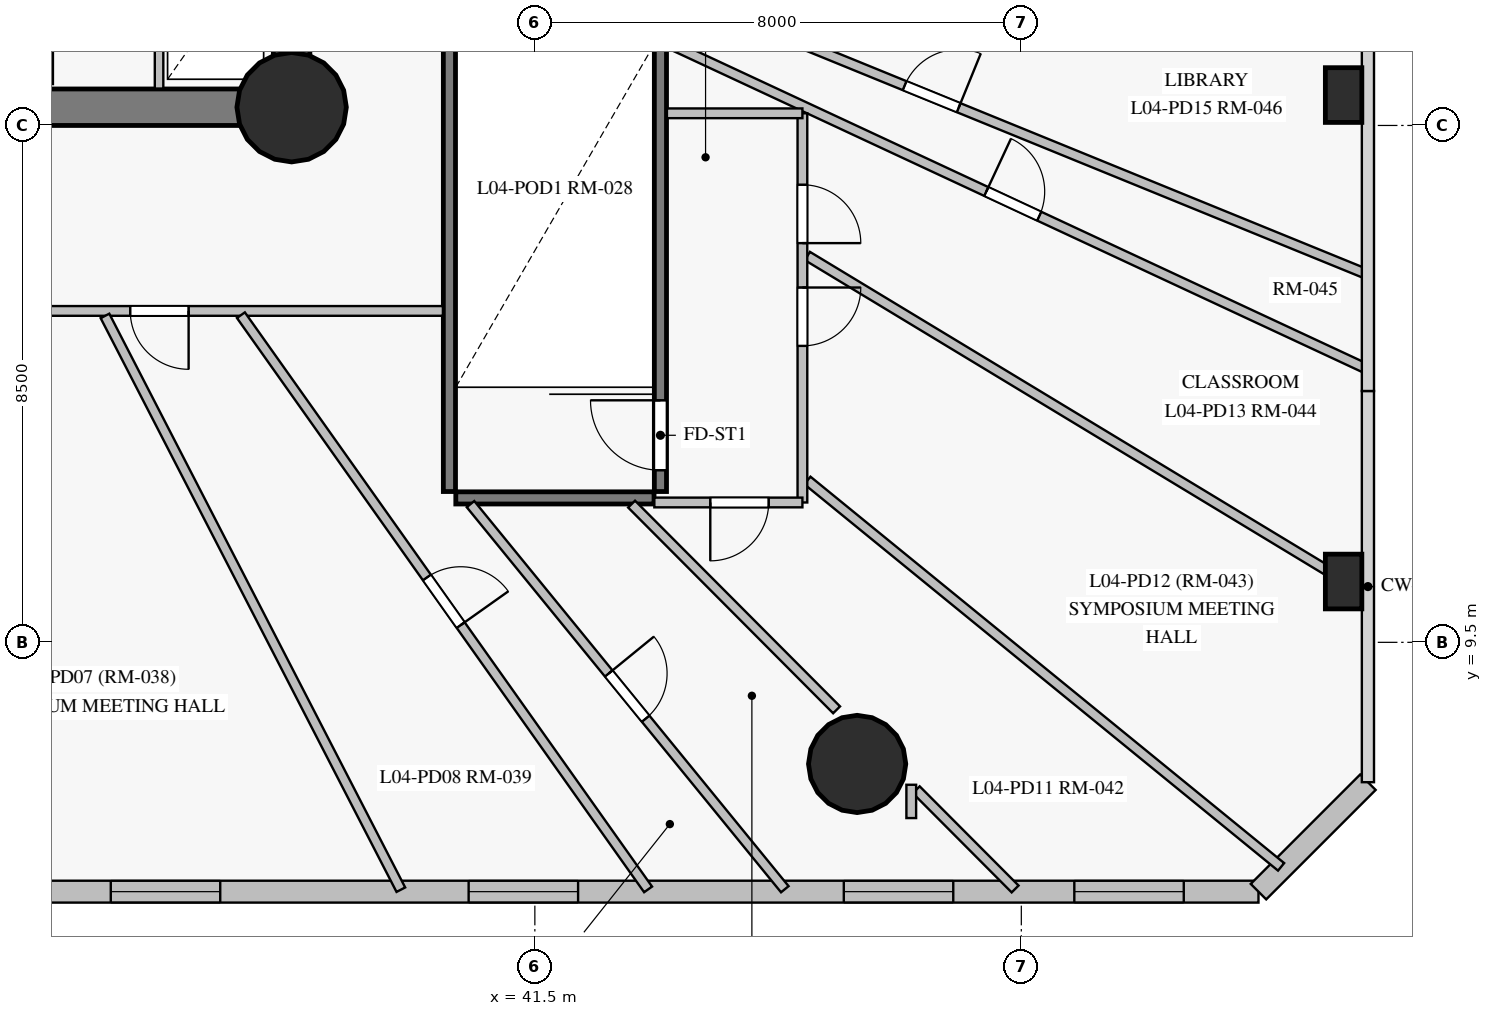
"""IFC4 building model, lengths in metres.
Left out: names, types, materials, properties, quantities, classifications, styles, units other than length and angle.
Written with IfcOpenShell. Run it as: python <this file> out.ifc"""

import sys

from ifc_helpers import new_model, si_unit, direction, frame, frame_2d, origin, origin_with_axes, origin_2d, place, context, subcontext, project, spatial, rectangle, circle, extrude, source, transform, mapped, element, fill, save


model = new_model("IFC4")
c1 = context("Model", 3, precision=1e-05, world=origin(), true_north=direction((0.0, 1.0)))
c2 = subcontext(c1, "Body", "Model", "MODEL_VIEW")
j1 = project(units=[si_unit("LENGTHUNIT", "METRE"), si_unit("PLANEANGLEUNIT", "RADIAN")], contexts=[c1])
p1 = place(None, origin())
s1 = spatial("IfcSite", under=j1, at=p1, CompositionType="ELEMENT")
p2 = place(p1, origin())
s2 = spatial("IfcBuilding", under=s1, at=p2, CompositionType="ELEMENT")
p3 = place(p2, frame((0.0, 0.0, 18.0)))
s3 = spatial("IfcBuildingStorey", under=s2, at=p3, CompositionType="ELEMENT", Elevation=18.0)
p4 = place(p3, frame((26.55, 18.3, 0.0), z_axis=(0.0, 0.0, 1.0), x_axis=(1.0, 0.0, 0.0)))
e1 = element("IfcWall", 1, at=p4, inside=s3, PredefinedType="SHEAR", context=c2, shape_type="SweptSolid", body=[
    extrude(rectangle(XDim=10.95, YDim=0.6, at=frame_2d((5.475, 0.0))), origin(), (0.0, 0.0, 1.0), 4.225),
])
p5 = place(p4, frame((4.55, 0.0, 0.0)))
e2 = element("IfcOpeningElement", 2, at=p5, cuts=e1, PredefinedType="OPENING", context=c2, shape_type="SweptSolid", body=[
    extrude(rectangle(XDim=1.4, YDim=2.2, at=frame_2d((0.7, 1.1))), frame((0.0, 0.31, 0.0), z_axis=(0.0, -1.0, 0.0), x_axis=(1.0, 0.0, 0.0)), (0.0, 0.0, 1.0), 0.62),
])
p6 = place(p3, frame((37.5, 18.3, 0.0), z_axis=(0.0, 0.0, 1.0), x_axis=(0.0, 1.0, 0.0)))
e3 = element("IfcWall", 3, at=p6, inside=s3, PredefinedType="SHEAR", context=c2, shape_type="SweptSolid", body=[
    extrude(rectangle(XDim=16.4, YDim=0.6, at=frame_2d((8.2, 0.0))), origin(), (0.0, 0.0, 1.0), 4.225),
])
p7 = place(p6, frame((13.96, 0.0, 0.0)))
e4 = element("IfcOpeningElement", 4, at=p7, cuts=e3, PredefinedType="OPENING", context=c2, shape_type="SweptSolid", body=[
    extrude(rectangle(XDim=1.2, YDim=2.15, at=frame_2d((0.6, 1.075))), frame((0.0, 0.31, 0.0), z_axis=(0.0, -1.0, 0.0), x_axis=(1.0, 0.0, 0.0)), (0.0, 0.0, 1.0), 0.62),
])
m1 = source(origin_with_axes(), c2, "Body", "SweptSolid", [
    extrude(circle(Radius=0.9, at=origin_2d()), origin(), (0.0, 0.0, 1.0), 4.5),
])
p8 = place(p3, frame((37.5, 18.3, 0.0), z_axis=(0.0, 0.0, 1.0), x_axis=(1.0, 0.0, 0.0)))
e5 = element("IfcColumn", 5, at=p8, inside=s3, PredefinedType="COLUMN", context=c2, shape_type="MappedRepresentation", body=[
    mapped(m1, transform((0.0, 0.0, 0.0), scale=1.0)),
])
m2 = source(origin_with_axes(), c2, "Body", "SweptSolid", [
    extrude(circle(Radius=0.8, at=origin_2d()), origin(), (0.0, 0.0, 1.0), 4.5),
])
p9 = place(p3, frame((46.8, 7.5, 0.0), z_axis=(0.0, 0.0, 1.0), x_axis=(1.0, 0.0, 0.0)))
e6 = element("IfcColumn", 6, at=p9, inside=s3, PredefinedType="COLUMN", context=c2, shape_type="MappedRepresentation", body=[
    mapped(m2, transform((0.0, 0.0, 0.0), scale=1.0)),
])
m3 = source(origin_with_axes(), c2, "Body", "SweptSolid", [
    extrude(rectangle(XDim=0.6, YDim=0.9, at=origin_2d()), origin(), (0.0, 0.0, 1.0), 4.5),
])
for number, where, z_axis, x_axis in (
    (7, (54.8, 10.5, 0.0), (0.0, 0.0, 1.0), (1.0, 0.0, 0.0)),
    (8, (54.8, 18.5, 0.0), (0.0, 0.0, 1.0), (1.0, 0.0, 0.0)),
):
    element("IfcColumn", number, at=place(p3, frame(where, z_axis=z_axis, x_axis=x_axis)), inside=s3, PredefinedType="PILASTER", context=c2, shape_type="MappedRepresentation", body=[
        mapped(m3, transform((0.0, 0.0, 0.0), scale=1.0)),
    ])
p10 = place(p3, frame((9.1, 5.4, 0.0), z_axis=(0.0, 0.0, 1.0), x_axis=(1.0, 0.0, 0.0)))
e9 = element("IfcWall", 9, at=p10, inside=s3, PredefinedType="SOLIDWALL", context=c2, shape_type="SweptSolid", body=[
    extrude(rectangle(XDim=44.3, YDim=0.36, at=frame_2d((22.15, 0.0))), origin(), (0.0, 0.0, 1.0), 4.225),
])
p11 = place(p10, frame((0.934, 0.0, 0.85)))
e10 = element("IfcOpeningElement", 10, at=p11, cuts=e9, PredefinedType="OPENING", context=c2, shape_type="SweptSolid", body=[
    extrude(rectangle(XDim=1.8, YDim=2.2, at=frame_2d((0.9, 1.1))), frame((0.0, 0.19, 0.0), z_axis=(0.0, -1.0, 0.0), x_axis=(1.0, 0.0, 0.0)), (0.0, 0.0, 1.0), 0.38),
])
p12 = place(p10, frame((8.148, 0.0, 0.85)))
e11 = element("IfcOpeningElement", 11, at=p12, cuts=e9, PredefinedType="OPENING", context=c2, shape_type="SweptSolid", body=[
    extrude(rectangle(XDim=1.8, YDim=2.2, at=frame_2d((0.9, 1.1))), frame((0.0, 0.19, 0.0), z_axis=(0.0, -1.0, 0.0), x_axis=(1.0, 0.0, 0.0)), (0.0, 0.0, 1.0), 0.38),
])
p13 = place(p10, frame((13.3, 0.0, 0.85)))
e12 = element("IfcOpeningElement", 12, at=p13, cuts=e9, PredefinedType="OPENING", context=c2, shape_type="SweptSolid", body=[
    extrude(rectangle(XDim=1.8, YDim=2.2, at=frame_2d((0.9, 1.1))), frame((0.0, 0.19, 0.0), z_axis=(0.0, -1.0, 0.0), x_axis=(1.0, 0.0, 0.0)), (0.0, 0.0, 1.0), 0.38),
])
p14 = place(p10, frame((18.486, 0.0, 0.85)))
e13 = element("IfcOpeningElement", 13, at=p14, cuts=e9, PredefinedType="OPENING", context=c2, shape_type="SweptSolid", body=[
    extrude(rectangle(XDim=1.8, YDim=2.2, at=frame_2d((0.9, 1.1))), frame((0.0, 0.19, 0.0), z_axis=(0.0, -1.0, 0.0), x_axis=(1.0, 0.0, 0.0)), (0.0, 0.0, 1.0), 0.38),
])
p15 = place(p10, frame((25.426, 0.0, 0.85)))
e14 = element("IfcOpeningElement", 14, at=p15, cuts=e9, PredefinedType="OPENING", context=c2, shape_type="SweptSolid", body=[
    extrude(rectangle(XDim=1.8, YDim=2.2, at=frame_2d((0.9, 1.1))), frame((0.0, 0.19, 0.0), z_axis=(0.0, -1.0, 0.0), x_axis=(1.0, 0.0, 0.0)), (0.0, 0.0, 1.0), 0.38),
])
p16 = place(p10, frame((31.311, 0.0, 0.85)))
e15 = element("IfcOpeningElement", 15, at=p16, cuts=e9, PredefinedType="OPENING", context=c2, shape_type="SweptSolid", body=[
    extrude(rectangle(XDim=1.8, YDim=2.2, at=frame_2d((0.9, 1.1))), frame((0.0, 0.19, 0.0), z_axis=(0.0, -1.0, 0.0), x_axis=(1.0, 0.0, 0.0)), (0.0, 0.0, 1.0), 0.38),
])
p17 = place(p10, frame((37.481, 0.0, 0.85)))
e16 = element("IfcOpeningElement", 16, at=p17, cuts=e9, PredefinedType="OPENING", context=c2, shape_type="SweptSolid", body=[
    extrude(rectangle(XDim=1.8, YDim=2.2, at=frame_2d((0.9, 1.1))), frame((0.0, 0.19, 0.0), z_axis=(0.0, -1.0, 0.0), x_axis=(1.0, 0.0, 0.0)), (0.0, 0.0, 1.0), 0.38),
])
p18 = place(p10, frame((41.271, 0.0, 0.85)))
e17 = element("IfcOpeningElement", 17, at=p18, cuts=e9, PredefinedType="OPENING", context=c2, shape_type="SweptSolid", body=[
    extrude(rectangle(XDim=1.8, YDim=2.2, at=frame_2d((0.9, 1.1))), frame((0.0, 0.19, 0.0), z_axis=(0.0, -1.0, 0.0), x_axis=(1.0, 0.0, 0.0)), (0.0, 0.0, 1.0), 0.38),
])
p19 = place(p3, frame((53.4, 5.4, 0.0), z_axis=(0.0, 0.0, 1.0), x_axis=(0.707106781187, 0.707106781187, 0.0)))
e18 = element("IfcWall", 18, at=p19, inside=s3, PredefinedType="SOLIDWALL", context=c2, shape_type="SweptSolid", body=[
    extrude(rectangle(XDim=2.546, YDim=0.36, at=frame_2d((1.273, 0.0))), origin(), (0.0, 0.0, 1.0), 4.225),
])
p20 = place(p3, frame((40.095, 11.98, 0.0), z_axis=(0.0, 0.0, 1.0), x_axis=(0.0, 1.0, 0.0)))
e19 = element("IfcWall", 19, at=p20, inside=s3, PredefinedType="SHEAR", context=c2, shape_type="SweptSolid", body=[
    extrude(rectangle(XDim=7.35, YDim=0.2, at=frame_2d((3.675, 0.0))), origin(), (0.0, 0.0, 1.0), 4.225),
])
p21 = place(p3, frame((43.565, 11.98, 0.0), z_axis=(0.0, 0.0, 1.0), x_axis=(0.0, 1.0, 0.0)))
e20 = element("IfcWall", 20, at=p21, inside=s3, PredefinedType="SHEAR", context=c2, shape_type="SweptSolid", body=[
    extrude(rectangle(XDim=7.35, YDim=0.2, at=frame_2d((3.675, 0.0))), origin(), (0.0, 0.0, 1.0), 4.225),
])
p22 = place(p21, frame((0.35, 0.0, 0.0)))
e21 = element("IfcOpeningElement", 21, at=p22, cuts=e20, PredefinedType="OPENING", context=c2, shape_type="SweptSolid", body=[
    extrude(rectangle(XDim=1.15, YDim=2.15, at=frame_2d((0.575, 1.075))), frame((0.0, 0.11, 0.0), z_axis=(0.0, -1.0, 0.0), x_axis=(1.0, 0.0, 0.0)), (0.0, 0.0, 1.0), 0.22),
])
p23 = place(p3, frame((40.2, 11.875, 0.0), z_axis=(0.0, 0.0, 1.0), x_axis=(1.0, 0.0, 0.0)))
e22 = element("IfcWall", 22, at=p23, inside=s3, PredefinedType="SHEAR", context=c2, shape_type="SweptSolid", body=[
    extrude(rectangle(XDim=3.26, YDim=0.2, at=frame_2d((1.63, 0.0))), origin(), (0.0, 0.0, 1.0), 4.225),
])
p24 = place(p3, frame((40.918, 21.372, 0.0), z_axis=(0.0, 0.0, 1.0), x_axis=(0.92597161246, -0.377593131449, 0.0)))
e23 = element("IfcWall", 23, at=p24, inside=s3, PredefinedType="PARTITIONING", context=c2, shape_type="SweptSolid", body=[
    extrude(rectangle(XDim=15.392, YDim=0.16, at=frame_2d((7.696, 0.0))), origin(), (0.0, 0.0, 1.0), 2.725),
])
p25 = place(p24, frame((7.196, 0.0, 0.0)))
e24 = element("IfcOpeningElement", 24, at=p25, cuts=e23, PredefinedType="OPENING", context=c2, shape_type="SweptSolid", body=[
    extrude(rectangle(XDim=0.96, YDim=2.15, at=frame_2d((0.48, 1.075))), frame((0.0, 0.09, 0.0), z_axis=(0.0, -1.0, 0.0), x_axis=(1.0, 0.0, 0.0)), (0.0, 0.0, 1.0), 0.18),
])
p26 = place(p3, frame((39.988, 14.95, 0.0), z_axis=(0.0, 0.0, 1.0), x_axis=(-1.0, 0.0, 0.0)))
e25 = element("IfcWall", 25, at=p26, inside=s3, PredefinedType="PARTITIONING", context=c2, shape_type="SweptSolid", body=[
    extrude(rectangle(XDim=14.588, YDim=0.16, at=frame_2d((7.294, 0.0))), origin(), (0.0, 0.0, 1.0), 2.825),
])
p27 = place(p26, frame((10.34, 0.0, 0.0)))
e26 = element("IfcOpeningElement", 26, at=p27, cuts=e25, PredefinedType="OPENING", context=c2, shape_type="SweptSolid", body=[
    extrude(rectangle(XDim=0.96, YDim=2.15, at=frame_2d((0.48, 1.075))), frame((0.0, 0.09, 0.0), z_axis=(0.0, -1.0, 0.0), x_axis=(1.0, 0.0, 0.0)), (0.0, 0.0, 1.0), 0.18),
])
p28 = place(p26, frame((6.735, 0.0, 0.0)))
e27 = element("IfcOpeningElement", 27, at=p28, cuts=e25, PredefinedType="OPENING", context=c2, shape_type="SweptSolid", body=[
    extrude(rectangle(XDim=0.96, YDim=2.15, at=frame_2d((0.48, 1.075))), frame((0.0, 0.09, 0.0), z_axis=(0.0, -1.0, 0.0), x_axis=(1.0, 0.0, 0.0)), (0.0, 0.0, 1.0), 0.18),
])
p29 = place(p26, frame((4.182, 0.0, 0.0)))
e28 = element("IfcOpeningElement", 28, at=p29, cuts=e25, PredefinedType="OPENING", context=c2, shape_type="SweptSolid", body=[
    extrude(rectangle(XDim=0.96, YDim=2.15, at=frame_2d((0.48, 1.075))), frame((0.0, 0.09, 0.0), z_axis=(0.0, -1.0, 0.0), x_axis=(1.0, 0.0, 0.0)), (0.0, 0.0, 1.0), 0.18),
])
p30 = place(p3, frame((43.573, 19.408, 0.0), z_axis=(0.0, 0.0, 1.0), x_axis=(0.906378533885, -0.422466511468, 0.0)))
e29 = element("IfcWall", 29, at=p30, inside=s3, PredefinedType="PARTITIONING", context=c2, shape_type="SweptSolid", body=[
    extrude(rectangle(XDim=12.794, YDim=0.16, at=frame_2d((6.397, 0.0))), origin(), (0.0, 0.0, 1.0), 2.725),
])
p31 = place(p30, frame((5.905, 0.0, 0.0)))
e30 = element("IfcOpeningElement", 30, at=p31, cuts=e29, PredefinedType="OPENING", context=c2, shape_type="SweptSolid", body=[
    extrude(rectangle(XDim=0.96, YDim=2.15, at=frame_2d((0.48, 1.075))), frame((0.0, 0.09, 0.0), z_axis=(0.0, -1.0, 0.0), x_axis=(1.0, 0.0, 0.0)), (0.0, 0.0, 1.0), 0.18),
])
p32 = place(p3, frame((36.666, 14.88, 0.0), z_axis=(0.0, 0.0, 1.0), x_axis=(0.578443831224, -0.815722216272, 0.0)))
e31 = element("IfcWall", 31, at=p32, inside=s3, PredefinedType="PARTITIONING", context=c2, shape_type="SweptSolid", body=[
    extrude(rectangle(XDim=11.576, YDim=0.16, at=frame_2d((5.788, 0.0))), origin(), (0.0, 0.0, 1.0), 4.225),
])
p33 = place(p32, frame((5.288, 0.0, 0.0)))
e32 = element("IfcOpeningElement", 32, at=p33, cuts=e31, PredefinedType="OPENING", context=c2, shape_type="SweptSolid", body=[
    extrude(rectangle(XDim=0.96, YDim=2.15, at=frame_2d((0.48, 1.075))), frame((0.0, 0.09, 0.0), z_axis=(0.0, -1.0, 0.0), x_axis=(1.0, 0.0, 0.0)), (0.0, 0.0, 1.0), 0.18),
])
p34 = place(p3, frame((45.982, 15.853, 0.0), z_axis=(0.0, 0.0, 1.0), x_axis=(0.855606653808, -0.517626558398, 0.0)))
e33 = element("IfcWall", 33, at=p34, inside=s3, PredefinedType="PARTITIONING", context=c2, shape_type="SweptSolid", body=[
    extrude(rectangle(XDim=10.733, YDim=0.16, at=frame_2d((5.367, 0.0))), origin(), (0.0, 0.0, 1.0), 4.225),
])
p35 = place(p3, frame((34.431, 14.868, 0.0), z_axis=(0.0, 0.0, 1.0), x_axis=(0.458318369651, -0.888788091752, 0.0)))
e34 = element("IfcWall", 34, at=p35, inside=s3, PredefinedType="PARTITIONING", context=c2, shape_type="SweptSolid", body=[
    extrude(rectangle(XDim=10.616, YDim=0.16, at=frame_2d((5.308, 0.0))), origin(), (0.0, 0.0, 1.0), 4.225),
])
p36 = place(p3, frame((45.982, 12.162, 0.0), z_axis=(0.0, 0.0, 1.0), x_axis=(0.774901017442, -0.632082599956, 0.0)))
e35 = element("IfcWall", 35, at=p36, inside=s3, PredefinedType="PARTITIONING", context=c2, shape_type="SweptSolid", body=[
    extrude(rectangle(XDim=10.053, YDim=0.16, at=frame_2d((5.027, 0.0))), origin(), (0.0, 0.0, 1.0), 4.225),
])
p37 = place(p3, frame((40.442, 11.773, 0.0), z_axis=(0.0, 0.0, 1.0), x_axis=(0.632298947072, -0.774724493954, 0.0)))
e36 = element("IfcWall", 36, at=p37, inside=s3, PredefinedType="PARTITIONING", context=c2, shape_type="SweptSolid", body=[
    extrude(rectangle(XDim=8.175, YDim=0.16, at=frame_2d((4.087, 0.0))), origin(), (0.0, 0.0, 1.0), 4.225),
])
p38 = place(p37, frame((3.595, 0.0, 0.0)))
e37 = element("IfcOpeningElement", 37, at=p38, cuts=e36, PredefinedType="OPENING", context=c2, shape_type="SweptSolid", body=[
    extrude(rectangle(XDim=0.96, YDim=2.15, at=frame_2d((0.48, 1.075))), frame((0.0, 0.09, 0.0), z_axis=(0.0, -1.0, 0.0), x_axis=(1.0, 0.0, 0.0)), (0.0, 0.0, 1.0), 0.18),
])
p39 = place(p3, frame((45.9, 18.2, 0.0), z_axis=(0.0, 0.0, 1.0), x_axis=(0.0, -1.0, 0.0)))
e38 = element("IfcWall", 38, at=p39, inside=s3, PredefinedType="PARTITIONING", context=c2, shape_type="SweptSolid", body=[
    extrude(rectangle(XDim=6.4, YDim=0.16, at=frame_2d((3.2, 0.0))), origin(), (0.0, 0.0, 1.0), 4.225),
])
p40 = place(p39, frame((2.865, 0.0, 0.0)))
e39 = element("IfcOpeningElement", 39, at=p40, cuts=e38, PredefinedType="OPENING", context=c2, shape_type="SweptSolid", body=[
    extrude(rectangle(XDim=0.96, YDim=2.15, at=frame_2d((0.48, 1.075))), frame((0.0, 0.09, 0.0), z_axis=(0.0, -1.0, 0.0), x_axis=(1.0, 0.0, 0.0)), (0.0, 0.0, 1.0), 0.18),
])
p41 = place(p39, frame((1.175, 0.0, 0.0)))
e40 = element("IfcOpeningElement", 40, at=p41, cuts=e38, PredefinedType="OPENING", context=c2, shape_type="SweptSolid", body=[
    extrude(rectangle(XDim=0.96, YDim=2.15, at=frame_2d((0.48, 1.075))), frame((0.0, 0.09, 0.0), z_axis=(0.0, -1.0, 0.0), x_axis=(1.0, 0.0, 0.0)), (0.0, 0.0, 1.0), 0.18),
])
p42 = place(p3, frame((43.091, 11.773, 0.0), z_axis=(0.0, 0.0, 1.0), x_axis=(0.705853252823, -0.708358091278, 0.0)))
e41 = element("IfcWall", 41, at=p42, inside=s3, PredefinedType="PARTITIONING", context=c2, shape_type="SweptSolid", body=[
    extrude(rectangle(XDim=4.776, YDim=0.16, at=frame_2d((2.388, 0.0))), origin(), (0.0, 0.0, 1.0), 2.725),
])
p43 = place(p3, frame((35.32, 18.607, 0.0), z_axis=(0.0, 0.0, 1.0), x_axis=(0.0, 1.0, 0.0)))
e42 = element("IfcWall", 42, at=p43, inside=s3, PredefinedType="PARTITIONING", context=c2, shape_type="SweptSolid", body=[
    extrude(rectangle(XDim=2.503, YDim=0.14, at=frame_2d((1.251, 0.0))), origin(), (0.0, 0.0, 1.0), 4.225),
])
p44 = place(p3, frame((47.772, 7.075, 0.0), z_axis=(0.0, 0.0, 1.0), x_axis=(0.705886856968, -0.708324604372, 0.0)))
e43 = element("IfcWall", 43, at=p44, inside=s3, PredefinedType="PARTITIONING", context=c2, shape_type="SweptSolid", body=[
    extrude(rectangle(XDim=2.303, YDim=0.16, at=frame_2d((1.152, 0.0))), origin(), (0.0, 0.0, 1.0), 4.225),
])
p45 = place(p3, frame((45.9, 11.8, 0.0), z_axis=(0.0, 0.0, 1.0), x_axis=(-1.0, 0.0, 0.0)))
e44 = element("IfcWall", 44, at=p45, inside=s3, PredefinedType="PARTITIONING", context=c2, shape_type="SweptSolid", body=[
    extrude(rectangle(XDim=2.435, YDim=0.16, at=frame_2d((1.217, 0.0))), origin(), (0.0, 0.0, 1.0), 4.225),
])
p46 = place(p45, frame((0.555, 0.0, 0.0)))
e45 = element("IfcOpeningElement", 45, at=p46, cuts=e44, PredefinedType="OPENING", context=c2, shape_type="SweptSolid", body=[
    extrude(rectangle(XDim=0.96, YDim=2.15, at=frame_2d((0.48, 1.075))), frame((0.0, 0.09, 0.0), z_axis=(0.0, -1.0, 0.0), x_axis=(1.0, 0.0, 0.0)), (0.0, 0.0, 1.0), 0.18),
])
p47 = place(p3, frame((43.672, 18.2, 0.0), z_axis=(0.0, 0.0, 1.0), x_axis=(1.0, 0.0, 0.0)))
e46 = element("IfcWall", 46, at=p47, inside=s3, PredefinedType="PARTITIONING", context=c2, shape_type="SweptSolid", body=[
    extrude(rectangle(XDim=2.228, YDim=0.16, at=frame_2d((1.114, 0.0))), origin(), (0.0, 0.0, 1.0), 4.225),
])
p48 = place(p3, frame((47.69, 6.61, 0.0), z_axis=(0.0, 0.0, 1.0), x_axis=(0.0, 1.0, 0.0)))
e47 = element("IfcWall", 47, at=p48, inside=s3, PredefinedType="PARTITIONING", context=c2, shape_type="SweptSolid", body=[
    extrude(rectangle(XDim=0.548, YDim=0.16, at=frame_2d((0.274, 0.0))), origin(), (0.0, 0.0, 1.0), 4.225),
])
m4 = source(origin_with_axes(), c2, "Body", "SweptSolid", [
    extrude(rectangle(XDim=1.8, YDim=2.2, at=frame_2d((0.9, 1.1))), frame((0.0, 0.03, 0.0), z_axis=(0.0, -1.0, 0.0), x_axis=(1.0, 0.0, 0.0)), (0.0, 0.0, 1.0), 0.06),
])
p49 = place(p15, origin())
e48 = element("IfcWindow", 48, at=p49, inside=s3, PartitioningType="SINGLE_PANEL", PredefinedType="WINDOW", context=c2, shape_type="MappedRepresentation", body=[
    mapped(m4, transform((0.0, 0.0, 0.0), scale=1.0)),
])
fill(e14, e48)
p50 = place(p16, origin())
e49 = element("IfcWindow", 49, at=p50, inside=s3, PartitioningType="SINGLE_PANEL", PredefinedType="WINDOW", context=c2, shape_type="MappedRepresentation", body=[
    mapped(m4, transform((0.0, 0.0, 0.0), scale=1.0)),
])
fill(e15, e49)
p51 = place(p17, origin())
e50 = element("IfcWindow", 50, at=p51, inside=s3, PartitioningType="SINGLE_PANEL", PredefinedType="WINDOW", context=c2, shape_type="MappedRepresentation", body=[
    mapped(m4, transform((0.0, 0.0, 0.0), scale=1.0)),
])
fill(e16, e50)
p52 = place(p18, origin())
e51 = element("IfcWindow", 51, at=p52, inside=s3, PartitioningType="SINGLE_PANEL", PredefinedType="WINDOW", context=c2, shape_type="MappedRepresentation", body=[
    mapped(m4, transform((0.0, 0.0, 0.0), scale=1.0)),
])
fill(e17, e51)
m5 = source(origin_with_axes(), c2, "Body", "SweptSolid", [
    extrude(rectangle(XDim=1.15, YDim=2.15, at=frame_2d((0.575, 1.075))), frame((0.0, 0.025, 0.0), z_axis=(0.0, -1.0, 0.0), x_axis=(1.0, 0.0, 0.0)), (0.0, 0.0, 1.0), 0.05),
])
p53 = place(p22, origin())
e52 = element("IfcDoor", 52, at=p53, inside=s3, OperationType="SINGLE_SWING_RIGHT", PredefinedType="DOOR", context=c2, shape_type="MappedRepresentation", body=[
    mapped(m5, transform((0.0, 0.0, 0.0), scale=1.0)),
])
fill(e21, e52)
m6 = source(origin_with_axes(), c2, "Body", "SweptSolid", [
    extrude(rectangle(XDim=0.96, YDim=2.15, at=frame_2d((0.48, 1.075))), frame((0.0, 0.025, 0.0), z_axis=(0.0, -1.0, 0.0), x_axis=(1.0, 0.0, 0.0)), (0.0, 0.0, 1.0), 0.05),
])
p54 = place(p29, origin())
e53 = element("IfcDoor", 53, at=p54, inside=s3, OperationType="SINGLE_SWING_LEFT", PredefinedType="DOOR", context=c2, shape_type="MappedRepresentation", body=[
    mapped(m6, transform((0.0, 0.0, 0.0), scale=1.0)),
])
fill(e28, e53)
p55 = place(p33, origin())
e54 = element("IfcDoor", 54, at=p55, inside=s3, OperationType="SINGLE_SWING_RIGHT", PredefinedType="DOOR", context=c2, shape_type="MappedRepresentation", body=[
    mapped(m6, transform((0.0, 0.0, 0.0), scale=1.0)),
])
fill(e32, e54)
p56 = place(p38, origin())
e55 = element("IfcDoor", 55, at=p56, inside=s3, OperationType="SINGLE_SWING_LEFT", PredefinedType="DOOR", context=c2, shape_type="MappedRepresentation", body=[
    mapped(m6, transform((0.0, 0.0, 0.0), scale=1.0)),
])
fill(e37, e55)
p57 = place(p46, origin())
e56 = element("IfcDoor", 56, at=p57, inside=s3, OperationType="SINGLE_SWING_RIGHT", PredefinedType="DOOR", context=c2, shape_type="MappedRepresentation", body=[
    mapped(m6, transform((0.0, 0.0, 0.0), scale=1.0)),
])
fill(e45, e56)
p58 = place(p40, origin())
e57 = element("IfcDoor", 57, at=p58, inside=s3, OperationType="SINGLE_SWING_LEFT", PredefinedType="DOOR", context=c2, shape_type="MappedRepresentation", body=[
    mapped(m6, transform((0.0, 0.0, 0.0), scale=1.0)),
])
fill(e39, e57)
p59 = place(p41, origin())
e58 = element("IfcDoor", 58, at=p59, inside=s3, OperationType="SINGLE_SWING_RIGHT", PredefinedType="DOOR", context=c2, shape_type="MappedRepresentation", body=[
    mapped(m6, transform((0.0, 0.0, 0.0), scale=1.0)),
])
fill(e40, e58)
p60 = place(p31, origin())
e59 = element("IfcDoor", 59, at=p60, inside=s3, OperationType="SINGLE_SWING_LEFT", PredefinedType="DOOR", context=c2, shape_type="MappedRepresentation", body=[
    mapped(m6, transform((0.0, 0.0, 0.0), scale=1.0)),
])
fill(e30, e59)
p61 = place(p25, origin())
e60 = element("IfcDoor", 60, at=p61, inside=s3, OperationType="SINGLE_SWING_RIGHT", PredefinedType="DOOR", context=c2, shape_type="MappedRepresentation", body=[
    mapped(m6, transform((0.0, 0.0, 0.0), scale=1.0)),
])
fill(e24, e60)
save(model, sys.argv[1])
